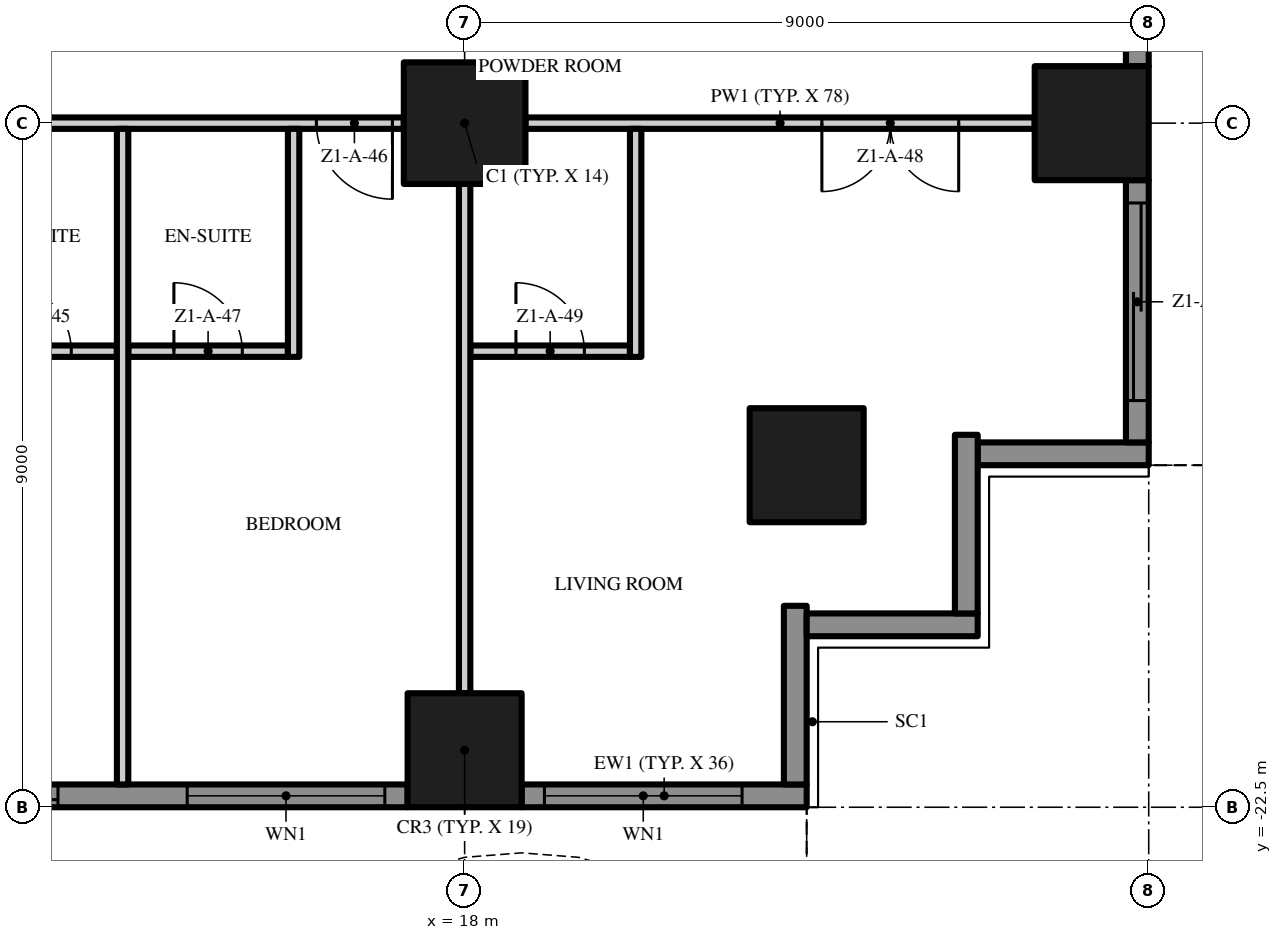
"""IFC4 building model, lengths in metres.
Left out: names, types, materials, properties, quantities, classifications, styles, units other than length and angle.
Written with IfcOpenShell. Run it as: python <this file> out.ifc"""

import sys

from ifc_helpers import new_model, si_unit, direction, frame, frame_2d, origin, origin_2d, place, context, subcontext, project, spatial, polyline, rectangle, outline, extrude, element, fill, save


model = new_model("IFC4")
c1 = context("Model", 3, precision=1e-05, world=origin(), true_north=direction((0.0, 1.0)))
c2 = subcontext(c1, "Body", "Model", "MODEL_VIEW")
j1 = project(units=[si_unit("LENGTHUNIT", "METRE"), si_unit("PLANEANGLEUNIT", "RADIAN")], contexts=[c1])
p1 = place(None, origin())
s1 = spatial("IfcSite", under=j1, at=p1, CompositionType="ELEMENT")
p2 = place(p1, origin())
s2 = spatial("IfcBuilding", under=s1, at=p2, CompositionType="ELEMENT")
p3 = place(p2, frame((0.0, 0.0, 15.0)))
s3 = spatial("IfcBuildingStorey", under=s2, at=p3, CompositionType="ELEMENT", Elevation=15.0)
p4 = place(p3, frame((18.0, -13.5, 0.0), z_axis=(0.0, 0.0, 1.0), x_axis=(1.0, 0.0, 0.0)))
e1 = element("IfcColumn", 1, at=p4, inside=s3, PredefinedType="COLUMN", context=c2, shape_type="SweptSolid", body=[
    extrude(rectangle(XDim=1.6, YDim=1.6, at=origin_2d()), origin(), (0.0, 0.0, 1.0), 3.5),
])
for number, where, z_axis, x_axis in (
    (2, (18.0, -21.75, 0.0), (0.0, 0.0, 1.0), (1.0, 0.0, 0.0)),
    (3, (26.25, -13.5, 0.0), (0.0, 0.0, 1.0), (1.0, 0.0, 0.0)),
    (4, (22.5, -18.0, 0.0), (0.0, 0.0, 1.0), (1.0, 0.0, 0.0)),
):
    element("IfcColumn", number, at=place(p3, frame(where, z_axis=z_axis, x_axis=x_axis)), inside=s3, PredefinedType="COLUMN", context=c2, shape_type="SweptSolid", body=[
        extrude(rectangle(XDim=1.5, YDim=1.5, at=origin_2d()), origin(), (0.0, 0.0, 1.0), 3.5),
    ])
p5 = place(p3, frame((17.25, -22.35, 0.0), z_axis=(0.0, 0.0, 1.0), x_axis=(-1.0, 0.0, 0.0)))
e5 = element("IfcWall", 5, at=p5, inside=s3, PredefinedType="SOLIDWALL", context=c2, shape_type="SweptSolid", body=[
    extrude(rectangle(XDim=7.5, YDim=0.3, at=frame_2d((3.75, 0.0))), origin(), (0.0, 0.0, 1.0), 3.5),
])
p6 = place(p5, frame((4.6, 0.0, 0.0)))
e6 = element("IfcOpeningElement", 6, at=p6, cuts=e5, PredefinedType="OPENING", context=c2, shape_type="SweptSolid", body=[
    extrude(rectangle(XDim=2.6, YDim=2.4, at=frame_2d((1.3, 1.2))), frame((0.0, 0.16, 0.0), z_axis=(0.0, -1.0, 0.0), x_axis=(1.0, 0.0, 0.0)), (0.0, 0.0, 1.0), 0.32),
])
p7 = place(p5, frame((0.3, 0.0, 0.45)))
e7 = element("IfcOpeningElement", 7, at=p7, cuts=e5, PredefinedType="OPENING", context=c2, shape_type="SweptSolid", body=[
    extrude(rectangle(XDim=2.6, YDim=2.65, at=frame_2d((1.3, 1.325))), frame((0.0, 0.16, 0.0), z_axis=(0.0, -1.0, 0.0), x_axis=(1.0, 0.0, 0.0)), (0.0, 0.0, 1.0), 0.32),
])
p8 = place(p3, frame((22.5, -22.35, 0.0), z_axis=(0.0, 0.0, 1.0), x_axis=(-1.0, 0.0, 0.0)))
e8 = element("IfcWall", 8, at=p8, inside=s3, PredefinedType="SOLIDWALL", context=c2, shape_type="SweptSolid", body=[
    extrude(rectangle(XDim=3.75, YDim=0.3, at=frame_2d((1.875, 0.0))), origin(), (0.0, 0.0, 1.0), 3.5),
])
p9 = place(p8, frame((0.85, 0.0, 0.45)))
e9 = element("IfcOpeningElement", 9, at=p9, cuts=e8, PredefinedType="OPENING", context=c2, shape_type="SweptSolid", body=[
    extrude(rectangle(XDim=2.6, YDim=2.65, at=frame_2d((1.3, 1.325))), frame((0.0, 0.16, 0.0), z_axis=(0.0, -1.0, 0.0), x_axis=(1.0, 0.0, 0.0)), (0.0, 0.0, 1.0), 0.32),
])
p10 = place(p3, frame((22.35, -19.85, 0.0), z_axis=(0.0, 0.0, 1.0), x_axis=(0.0, -1.0, 0.0)))
e10 = element("IfcWall", 10, at=p10, inside=s3, PredefinedType="SOLIDWALL", context=c2, shape_type="SweptSolid", body=[
    extrude(rectangle(XDim=2.35, YDim=0.3, at=frame_2d((1.175, 0.0))), origin(), (0.0, 0.0, 1.0), 3.5),
])
p11 = place(p3, frame((24.75, -20.1, 0.0), z_axis=(0.0, 0.0, 1.0), x_axis=(-1.0, 0.0, 0.0)))
e11 = element("IfcWall", 11, at=p11, inside=s3, PredefinedType="SOLIDWALL", context=c2, shape_type="SweptSolid", body=[
    extrude(rectangle(XDim=2.25, YDim=0.3, at=frame_2d((1.125, 0.0))), origin(), (0.0, 0.0, 1.0), 3.5),
])
p12 = place(p3, frame((24.6, -17.6, 0.0), z_axis=(0.0, 0.0, 1.0), x_axis=(0.0, -1.0, 0.0)))
e12 = element("IfcWall", 12, at=p12, inside=s3, PredefinedType="SOLIDWALL", context=c2, shape_type="SweptSolid", body=[
    extrude(rectangle(XDim=2.35, YDim=0.3, at=frame_2d((1.175, 0.0))), origin(), (0.0, 0.0, 1.0), 3.5),
])
p13 = place(p3, frame((27.0, -17.85, 0.0), z_axis=(0.0, 0.0, 1.0), x_axis=(-1.0, 0.0, 0.0)))
e13 = element("IfcWall", 13, at=p13, inside=s3, PredefinedType="SOLIDWALL", context=c2, shape_type="SweptSolid", body=[
    extrude(rectangle(XDim=2.25, YDim=0.3, at=frame_2d((1.125, 0.0))), origin(), (0.0, 0.0, 1.0), 3.5),
])
p14 = place(p3, frame((26.85, -14.25, 0.0), z_axis=(0.0, 0.0, 1.0), x_axis=(0.0, -1.0, 0.0)))
e14 = element("IfcWall", 14, at=p14, inside=s3, PredefinedType="SOLIDWALL", context=c2, shape_type="SweptSolid", body=[
    extrude(rectangle(XDim=3.45, YDim=0.3, at=frame_2d((1.725, 0.0))), origin(), (0.0, 0.0, 1.0), 3.5),
])
p15 = place(p14, frame((0.3, 0.0, 0.0)))
e15 = element("IfcOpeningElement", 15, at=p15, cuts=e14, PredefinedType="OPENING", context=c2, shape_type="SweptSolid", body=[
    extrude(rectangle(XDim=2.6, YDim=2.4, at=frame_2d((1.3, 1.2))), frame((0.0, 0.16, 0.0), z_axis=(0.0, -1.0, 0.0), x_axis=(1.0, 0.0, 0.0)), (0.0, 0.0, 1.0), 0.32),
])
p16 = place(p3, frame((26.85, -5.25, 0.0), z_axis=(0.0, 0.0, 1.0), x_axis=(0.0, -1.0, 0.0)))
e16 = element("IfcWall", 16, at=p16, inside=s3, PredefinedType="SOLIDWALL", context=c2, shape_type="SweptSolid", body=[
    extrude(rectangle(XDim=7.5, YDim=0.3, at=frame_2d((3.75, 0.0))), origin(), (0.0, 0.0, 1.0), 3.5),
])
p17 = place(p16, frame((4.6, 0.0, 0.45)))
e17 = element("IfcOpeningElement", 17, at=p17, cuts=e16, PredefinedType="OPENING", context=c2, shape_type="SweptSolid", body=[
    extrude(rectangle(XDim=2.6, YDim=2.65, at=frame_2d((1.3, 1.325))), frame((0.0, 0.16, 0.0), z_axis=(0.0, -1.0, 0.0), x_axis=(1.0, 0.0, 0.0)), (0.0, 0.0, 1.0), 0.32),
])
p18 = place(p16, frame((0.3, 0.0, 0.45)))
e18 = element("IfcOpeningElement", 18, at=p18, cuts=e16, PredefinedType="OPENING", context=c2, shape_type="SweptSolid", body=[
    extrude(rectangle(XDim=2.6, YDim=2.65, at=frame_2d((1.3, 1.325))), frame((0.0, 0.16, 0.0), z_axis=(0.0, -1.0, 0.0), x_axis=(1.0, 0.0, 0.0)), (0.0, 0.0, 1.0), 0.32),
])
p19 = place(p3, origin())
e19 = element("IfcWall", 19, at=p19, inside=s3, PredefinedType="USERDEFINED", context=c2, shape_type="SweptSolid", body=[
    extrude(outline(polyline([(-22.5, -24.3), (-21.0, -25.005), (-19.5, -25.441), (-18.75, -25.5), (-18.0, -25.441), (-16.5, -25.005), (-15.0, -24.3), (-13.5, -23.595), (-12.0, -23.159), (-11.25, -23.1), (-10.5, -23.159), (-9.0, -23.595), (-7.5, -24.3), (-6.0, -25.005), (-4.5, -25.441), (-3.75, -25.5), (-3.0, -25.441), (-1.5, -25.005), (0.0, -24.3), (1.5, -23.595), (3.0, -23.159), (3.75, -23.1), (4.5, -23.159), (6.0, -23.595), (7.5, -24.3), (9.0, -25.005), (10.5, -25.441), (11.25, -25.5), (12.0, -25.441), (13.5, -25.005), (15.0, -24.3), (16.5, -23.595), (18.0, -23.159), (18.75, -23.1), (19.5, -23.159), (21.0, -23.595), (22.5, -24.3), (22.606, -24.074), (21.089, -23.36), (19.545, -22.911), (18.75, -22.849), (17.955, -22.911), (16.411, -23.36), (14.894, -24.074), (13.411, -24.771), (11.955, -25.194), (11.25, -25.249), (10.545, -25.194), (9.089, -24.771), (7.606, -24.074), (6.089, -23.36), (4.545, -22.911), (3.75, -22.849), (2.955, -22.911), (1.411, -23.36), (-0.106, -24.074), (-1.589, -24.771), (-3.045, -25.194), (-3.75, -25.249), (-4.455, -25.194), (-5.911, -24.771), (-7.394, -24.074), (-8.911, -23.36), (-10.455, -22.911), (-11.25, -22.849), (-12.045, -22.911), (-13.589, -23.36), (-15.106, -24.074), (-16.589, -24.771), (-18.045, -25.194), (-18.75, -25.249), (-19.455, -25.194), (-20.911, -24.771), (-22.394, -24.074), (-22.5, -24.3)])), origin(), (0.0, 0.0, 1.0), 0.9),
])
p20 = place(p3, origin())
e20 = element("IfcWall", 20, at=p20, inside=s3, PredefinedType="USERDEFINED", context=c2, shape_type="SweptSolid", body=[
    extrude(outline(polyline([(28.8, -18.0), (29.505, -16.5), (29.941, -15.0), (30.0, -14.25), (29.941, -13.5), (29.505, -12.0), (28.8, -10.5), (28.095, -9.0), (27.659, -7.5), (27.6, -6.75), (27.659, -6.0), (28.095, -4.5), (28.8, -3.0), (29.505, -1.5), (29.941, 0.0), (30.0, 0.75), (29.941, 1.5), (29.505, 3.0), (28.8, 4.5), (28.095, 6.0), (27.659, 7.5), (27.6, 8.25), (27.659, 9.0), (28.095, 10.5), (28.8, 12.0), (29.505, 13.5), (29.941, 15.0), (30.0, 15.75), (29.941, 16.5), (29.505, 18.0), (29.265, 17.93), (29.694, 16.455), (29.749, 15.75), (29.694, 15.045), (29.271, 13.589), (28.574, 12.106), (27.86, 10.589), (27.411, 9.045), (27.349, 8.25), (27.411, 7.455), (27.86, 5.911), (28.574, 4.394), (29.271, 2.911), (29.694, 1.455), (29.749, 0.75), (29.694, 0.045), (29.271, -1.411), (28.574, -2.894), (27.86, -4.411), (27.411, -5.955), (27.349, -6.75), (27.411, -7.545), (27.86, -9.089), (28.574, -10.606), (29.271, -12.089), (29.694, -13.545), (29.749, -14.25), (29.694, -14.955), (29.271, -16.411), (28.574, -17.894), (28.8, -18.0)])), origin(), (0.0, 0.0, 1.0), 0.9),
])
p21 = place(p3, frame((11.325, -16.5, 0.0), z_axis=(0.0, 0.0, 1.0), x_axis=(1.0, 0.0, 0.0)))
e21 = element("IfcWall", 21, at=p21, inside=s3, PredefinedType="PARTITIONING", context=c2, shape_type="SweptSolid", body=[
    extrude(rectangle(XDim=2.1, YDim=0.15, at=frame_2d((1.05, 0.0))), origin(), (0.0, 0.0, 1.0), 3.5),
])
p22 = place(p21, frame((0.6, 0.0, 0.0)))
e22 = element("IfcOpeningElement", 22, at=p22, cuts=e21, PredefinedType="OPENING", context=c2, shape_type="SweptSolid", body=[
    extrude(rectangle(XDim=0.9, YDim=2.1, at=frame_2d((0.45, 1.05))), frame((0.0, 0.085, 0.0), z_axis=(0.0, -1.0, 0.0), x_axis=(1.0, 0.0, 0.0)), (0.0, 0.0, 1.0), 0.17),
])
p23 = place(p3, frame((13.575, -16.5, 0.0), z_axis=(0.0, 0.0, 1.0), x_axis=(1.0, 0.0, 0.0)))
e23 = element("IfcWall", 23, at=p23, inside=s3, PredefinedType="PARTITIONING", context=c2, shape_type="SweptSolid", body=[
    extrude(rectangle(XDim=2.1, YDim=0.15, at=frame_2d((1.05, 0.0))), origin(), (0.0, 0.0, 1.0), 3.5),
])
p24 = place(p23, frame((0.6, 0.0, 0.0)))
e24 = element("IfcOpeningElement", 24, at=p24, cuts=e23, PredefinedType="OPENING", context=c2, shape_type="SweptSolid", body=[
    extrude(rectangle(XDim=0.9, YDim=2.1, at=frame_2d((0.45, 1.05))), frame((0.0, 0.085, 0.0), z_axis=(0.0, -1.0, 0.0), x_axis=(1.0, 0.0, 0.0)), (0.0, 0.0, 1.0), 0.17),
])
p25 = place(p3, frame((18.075, -16.5, 0.0), z_axis=(0.0, 0.0, 1.0), x_axis=(1.0, 0.0, 0.0)))
e25 = element("IfcWall", 25, at=p25, inside=s3, PredefinedType="PARTITIONING", context=c2, shape_type="SweptSolid", body=[
    extrude(rectangle(XDim=2.1, YDim=0.15, at=frame_2d((1.05, 0.0))), origin(), (0.0, 0.0, 1.0), 3.5),
])
p26 = place(p25, frame((0.6, 0.0, 0.0)))
e26 = element("IfcOpeningElement", 26, at=p26, cuts=e25, PredefinedType="OPENING", context=c2, shape_type="SweptSolid", body=[
    extrude(rectangle(XDim=0.9, YDim=2.1, at=frame_2d((0.45, 1.05))), frame((0.0, 0.085, 0.0), z_axis=(0.0, -1.0, 0.0), x_axis=(1.0, 0.0, 0.0)), (0.0, 0.0, 1.0), 0.17),
])
p27 = place(p3, frame((17.2, -13.5, 0.0), z_axis=(0.0, 0.0, 1.0), x_axis=(-1.0, 0.0, 0.0)))
e27 = element("IfcWall", 27, at=p27, inside=s3, PredefinedType="PARTITIONING", context=c2, shape_type="SweptSolid", body=[
    extrude(rectangle(XDim=7.4, YDim=0.15, at=frame_2d((3.7, 0.0))), origin(), (0.0, 0.0, 1.0), 3.5),
])
p28 = place(p27, frame((6.25, 0.0, 0.0)))
e28 = element("IfcOpeningElement", 28, at=p28, cuts=e27, PredefinedType="OPENING", context=c2, shape_type="SweptSolid", body=[
    extrude(rectangle(XDim=1.0, YDim=2.4, at=frame_2d((0.5, 1.2))), frame((0.0, 0.085, 0.0), z_axis=(0.0, -1.0, 0.0), x_axis=(1.0, 0.0, 0.0)), (0.0, 0.0, 1.0), 0.17),
])
p29 = place(p27, frame((0.15, 0.0, 0.0)))
e29 = element("IfcOpeningElement", 29, at=p29, cuts=e27, PredefinedType="OPENING", context=c2, shape_type="SweptSolid", body=[
    extrude(rectangle(XDim=1.0, YDim=2.4, at=frame_2d((0.5, 1.2))), frame((0.0, 0.085, 0.0), z_axis=(0.0, -1.0, 0.0), x_axis=(1.0, 0.0, 0.0)), (0.0, 0.0, 1.0), 0.17),
])
p30 = place(p3, frame((25.5, -13.5, 0.0), z_axis=(0.0, 0.0, 1.0), x_axis=(-1.0, 0.0, 0.0)))
e30 = element("IfcWall", 30, at=p30, inside=s3, PredefinedType="PARTITIONING", context=c2, shape_type="SweptSolid", body=[
    extrude(rectangle(XDim=6.7, YDim=0.15, at=frame_2d((3.35, 0.0))), origin(), (0.0, 0.0, 1.0), 3.5),
])
p31 = place(p30, frame((1.0, 0.0, 0.0)))
e31 = element("IfcOpeningElement", 31, at=p31, cuts=e30, PredefinedType="OPENING", context=c2, shape_type="SweptSolid", body=[
    extrude(rectangle(XDim=1.8, YDim=2.4, at=frame_2d((0.9, 1.2))), frame((0.0, 0.085, 0.0), z_axis=(0.0, -1.0, 0.0), x_axis=(1.0, 0.0, 0.0)), (0.0, 0.0, 1.0), 0.17),
])
p32 = place(p3, frame((13.5, -22.2, 0.0), z_axis=(0.0, 0.0, 1.0), x_axis=(0.0, 1.0, 0.0)))
e32 = element("IfcWall", 32, at=p32, inside=s3, PredefinedType="PARTITIONING", context=c2, shape_type="SweptSolid", body=[
    extrude(rectangle(XDim=8.625, YDim=0.15, at=frame_2d((4.312, 0.0))), origin(), (0.0, 0.0, 1.0), 3.5),
])
p33 = place(p3, frame((15.75, -16.575, 0.0), z_axis=(0.0, 0.0, 1.0), x_axis=(0.0, 1.0, 0.0)))
e33 = element("IfcWall", 33, at=p33, inside=s3, PredefinedType="PARTITIONING", context=c2, shape_type="SweptSolid", body=[
    extrude(rectangle(XDim=3.0, YDim=0.15, at=frame_2d((1.5, 0.0))), origin(), (0.0, 0.0, 1.0), 3.5),
])
p34 = place(p3, frame((18.0, -21.0, 0.0), z_axis=(0.0, 0.0, 1.0), x_axis=(0.0, 1.0, 0.0)))
e34 = element("IfcWall", 34, at=p34, inside=s3, PredefinedType="PARTITIONING", context=c2, shape_type="SweptSolid", body=[
    extrude(rectangle(XDim=6.7, YDim=0.15, at=frame_2d((3.35, 0.0))), origin(), (0.0, 0.0, 1.0), 3.5),
])
p35 = place(p3, frame((20.25, -16.575, 0.0), z_axis=(0.0, 0.0, 1.0), x_axis=(0.0, 1.0, 0.0)))
e35 = element("IfcWall", 35, at=p35, inside=s3, PredefinedType="PARTITIONING", context=c2, shape_type="SweptSolid", body=[
    extrude(rectangle(XDim=3.0, YDim=0.15, at=frame_2d((1.5, 0.0))), origin(), (0.0, 0.0, 1.0), 3.5),
])
p36 = place(p6, origin())
e36 = element("IfcDoor", 36, at=p36, inside=s3, OperationType="SINGLE_SWING_LEFT", PredefinedType="DOOR", context=c2, shape_type="SweptSolid", body=[
    extrude(rectangle(XDim=2.6, YDim=2.4, at=frame_2d((1.3, 1.2))), frame((0.0, 0.025, 0.0), z_axis=(0.0, -1.0, 0.0), x_axis=(1.0, 0.0, 0.0)), (0.0, 0.0, 1.0), 0.05),
])
fill(e6, e36)
p37 = place(p7, origin())
e37 = element("IfcWindow", 37, at=p37, inside=s3, PartitioningType="SINGLE_PANEL", PredefinedType="WINDOW", context=c2, shape_type="SweptSolid", body=[
    extrude(rectangle(XDim=2.6, YDim=2.65, at=frame_2d((1.3, 1.325))), frame((0.0, 0.03, 0.0), z_axis=(0.0, -1.0, 0.0), x_axis=(1.0, 0.0, 0.0)), (0.0, 0.0, 1.0), 0.06),
])
fill(e7, e37)
p38 = place(p9, origin())
e38 = element("IfcWindow", 38, at=p38, inside=s3, PartitioningType="SINGLE_PANEL", PredefinedType="WINDOW", context=c2, shape_type="SweptSolid", body=[
    extrude(rectangle(XDim=2.6, YDim=2.65, at=frame_2d((1.3, 1.325))), frame((0.0, 0.03, 0.0), z_axis=(0.0, -1.0, 0.0), x_axis=(1.0, 0.0, 0.0)), (0.0, 0.0, 1.0), 0.06),
])
fill(e9, e38)
p39 = place(p15, origin())
e39 = element("IfcDoor", 39, at=p39, inside=s3, OperationType="SINGLE_SWING_LEFT", PredefinedType="DOOR", context=c2, shape_type="SweptSolid", body=[
    extrude(rectangle(XDim=2.6, YDim=2.4, at=frame_2d((1.3, 1.2))), frame((0.0, 0.025, 0.0), z_axis=(0.0, -1.0, 0.0), x_axis=(1.0, 0.0, 0.0)), (0.0, 0.0, 1.0), 0.05),
])
fill(e15, e39)
p40 = place(p22, origin())
e40 = element("IfcDoor", 40, at=p40, inside=s3, OperationType="SINGLE_SWING_LEFT", PredefinedType="DOOR", context=c2, shape_type="SweptSolid", body=[
    extrude(rectangle(XDim=0.9, YDim=2.1, at=frame_2d((0.45, 1.05))), frame((0.0, 0.025, 0.0), z_axis=(0.0, -1.0, 0.0), x_axis=(1.0, 0.0, 0.0)), (0.0, 0.0, 1.0), 0.05),
])
fill(e22, e40)
p41 = place(p29, origin())
e41 = element("IfcDoor", 41, at=p41, inside=s3, OperationType="SINGLE_SWING_LEFT", PredefinedType="DOOR", context=c2, shape_type="SweptSolid", body=[
    extrude(rectangle(XDim=1.0, YDim=2.4, at=frame_2d((0.5, 1.2))), frame((0.0, 0.025, 0.0), z_axis=(0.0, -1.0, 0.0), x_axis=(1.0, 0.0, 0.0)), (0.0, 0.0, 1.0), 0.05),
])
fill(e29, e41)
p42 = place(p24, origin())
e42 = element("IfcDoor", 42, at=p42, inside=s3, OperationType="SINGLE_SWING_LEFT", PredefinedType="DOOR", context=c2, shape_type="SweptSolid", body=[
    extrude(rectangle(XDim=0.9, YDim=2.1, at=frame_2d((0.45, 1.05))), frame((0.0, 0.025, 0.0), z_axis=(0.0, -1.0, 0.0), x_axis=(1.0, 0.0, 0.0)), (0.0, 0.0, 1.0), 0.05),
])
fill(e24, e42)
p43 = place(p31, origin())
e43 = element("IfcDoor", 43, at=p43, inside=s3, OperationType="DOUBLE_DOOR_SINGLE_SWING", PredefinedType="DOOR", context=c2, shape_type="SweptSolid", body=[
    extrude(rectangle(XDim=1.8, YDim=2.4, at=frame_2d((0.9, 1.2))), frame((0.0, 0.025, 0.0), z_axis=(0.0, -1.0, 0.0), x_axis=(1.0, 0.0, 0.0)), (0.0, 0.0, 1.0), 0.05),
])
fill(e31, e43)
p44 = place(p26, origin())
e44 = element("IfcDoor", 44, at=p44, inside=s3, OperationType="SINGLE_SWING_LEFT", PredefinedType="DOOR", context=c2, shape_type="SweptSolid", body=[
    extrude(rectangle(XDim=0.9, YDim=2.1, at=frame_2d((0.45, 1.05))), frame((0.0, 0.025, 0.0), z_axis=(0.0, -1.0, 0.0), x_axis=(1.0, 0.0, 0.0)), (0.0, 0.0, 1.0), 0.05),
])
fill(e26, e44)
save(model, sys.argv[1])
